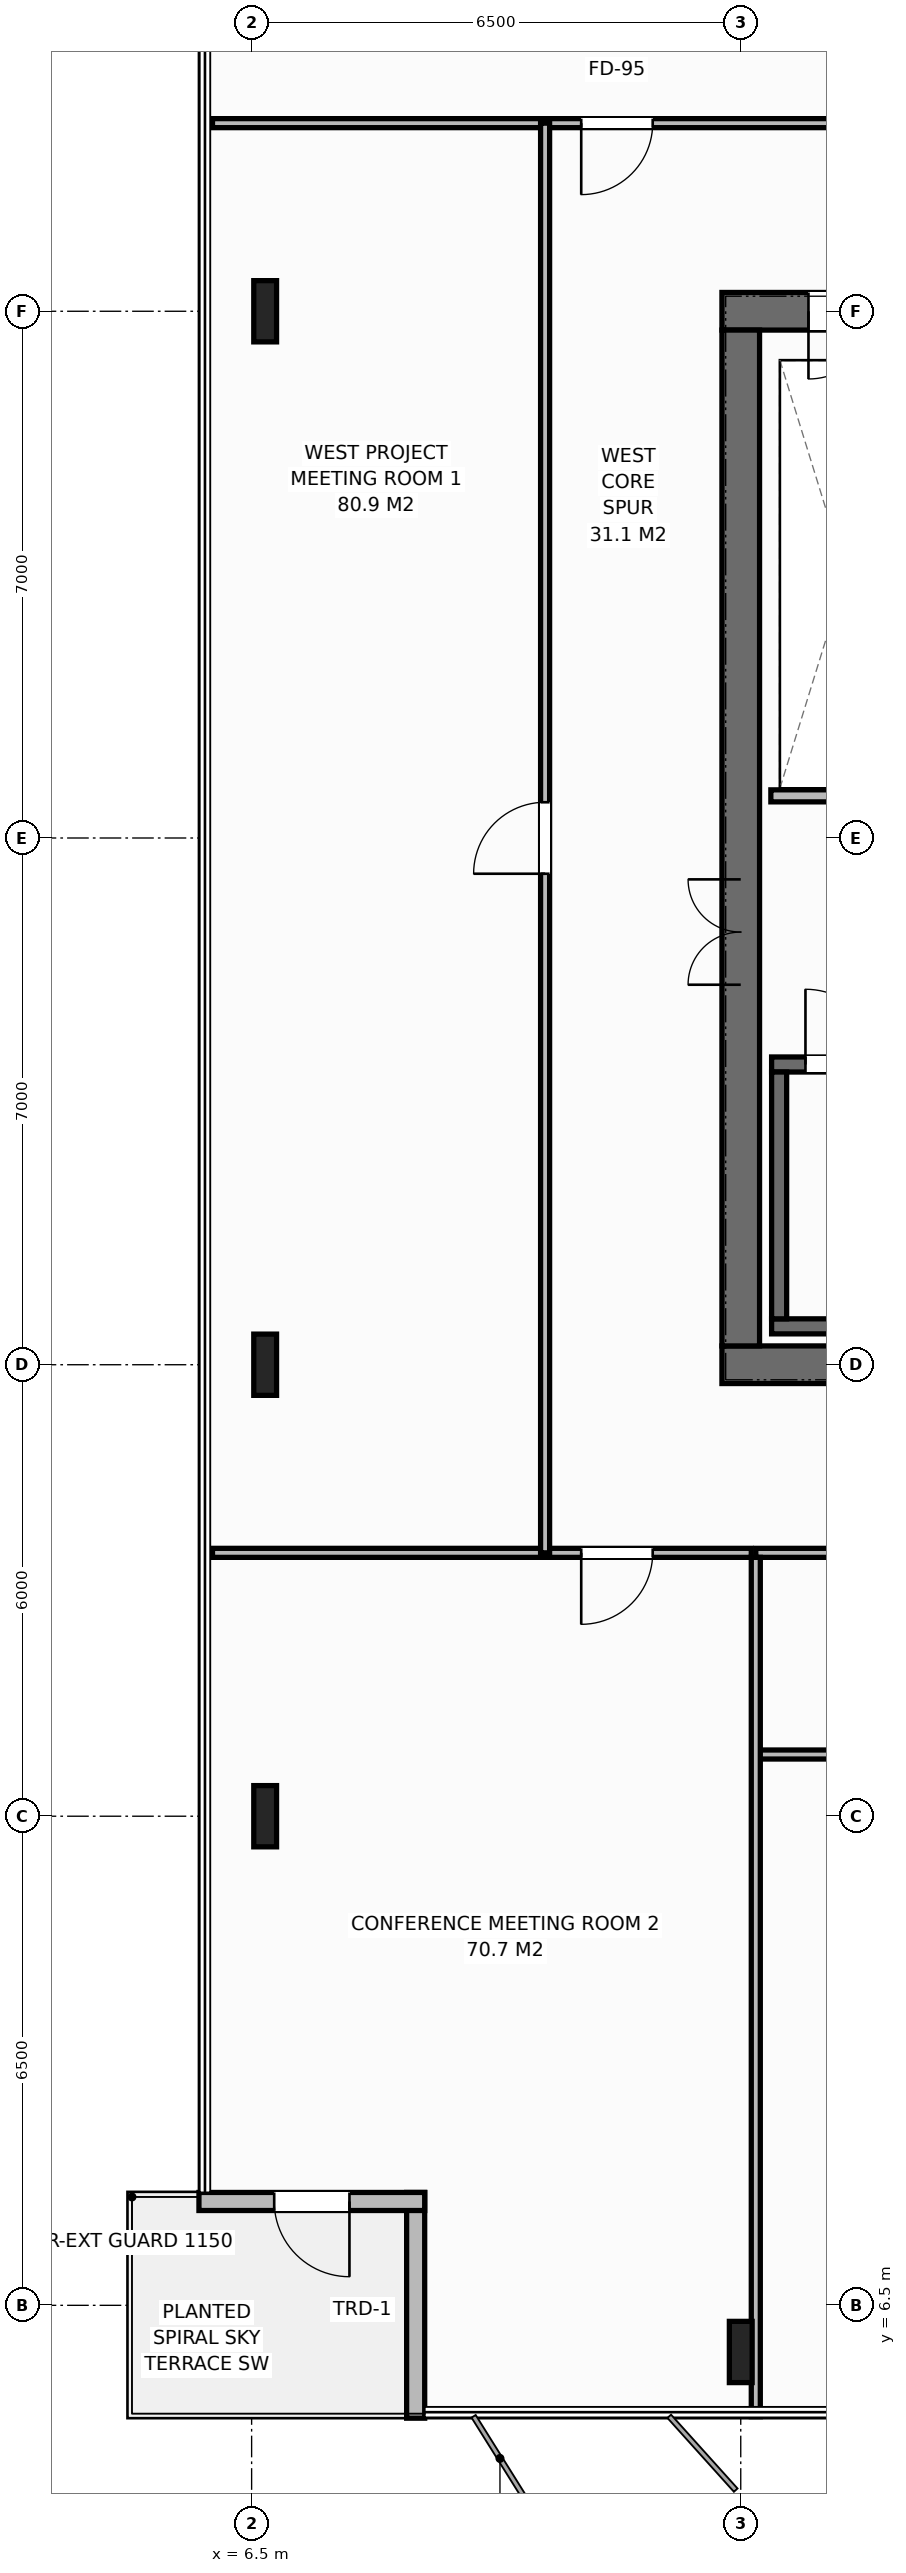
"""IFC4 building model, lengths in metres.
Left out: names, types, materials, properties, quantities, classifications, styles, units other than length and angle.
Written with IfcOpenShell. Run it as: python <this file> out.ifc"""

import sys

from ifc_helpers import new_model, si_unit, direction, frame, frame_2d, origin, origin_2d, place, context, subcontext, project, spatial, rectangle, i_section, extrude, element, fill, save


model = new_model("IFC4")
c1 = context("Model", 3, precision=1e-05, world=origin(), true_north=direction((0.0, 1.0)))
c2 = subcontext(c1, "Body", "Model", "MODEL_VIEW")
j1 = project(units=[si_unit("LENGTHUNIT", "METRE"), si_unit("PLANEANGLEUNIT", "RADIAN")], contexts=[c1])
p1 = place(None, origin())
s1 = spatial("IfcSite", under=j1, at=p1, CompositionType="ELEMENT")
p2 = place(p1, origin())
s2 = spatial("IfcBuilding", under=s1, at=p2, CompositionType="ELEMENT")
p3 = place(p2, frame((0.0, 0.0, 236.6)))
s3 = spatial("IfcBuildingStorey", under=s2, at=p3, CompositionType="ELEMENT", Elevation=236.6)
p4 = place(p3, frame((12.75, 19.0, 0.0), z_axis=(0.0, 0.0, 1.0), x_axis=(1.0, 0.0, 0.0)))
e1 = element("IfcWall", 1, at=p4, inside=s3, PredefinedType="SHEAR", context=c2, shape_type="SweptSolid", body=[
    extrude(rectangle(XDim=13.5, YDim=0.5, at=frame_2d((6.75, 0.0))), origin(), (0.0, 0.0, 1.0), 3.8),
])
p5 = place(p4, frame((9.13, 0.0, 0.0)))
e2 = element("IfcOpeningElement", 2, at=p5, cuts=e1, PredefinedType="OPENING", context=c2, shape_type="SweptSolid", body=[
    extrude(rectangle(XDim=1.4, YDim=2.2, at=frame_2d((0.7, 1.1))), frame((0.0, 0.26, 0.0), z_axis=(0.0, -1.0, 0.0), x_axis=(1.0, 0.0, 0.0)), (0.0, 0.0, 1.0), 0.52),
])
p6 = place(p3, frame((12.75, 33.0, 0.0), z_axis=(0.0, 0.0, 1.0), x_axis=(1.0, 0.0, 0.0)))
e3 = element("IfcWall", 3, at=p6, inside=s3, PredefinedType="SHEAR", context=c2, shape_type="SweptSolid", body=[
    extrude(rectangle(XDim=13.5, YDim=0.5, at=frame_2d((6.75, 0.0))), origin(), (0.0, 0.0, 1.0), 3.8),
])
p7 = place(p6, frame((1.15, 0.0, 0.0)))
e4 = element("IfcOpeningElement", 4, at=p7, cuts=e3, PredefinedType="OPENING", context=c2, shape_type="SweptSolid", body=[
    extrude(rectangle(XDim=0.9, YDim=2.15, at=frame_2d((0.45, 1.075))), frame((0.0, 0.26, 0.0), z_axis=(0.0, -1.0, 0.0), x_axis=(1.0, 0.0, 0.0)), (0.0, 0.0, 1.0), 0.52),
])
p8 = place(p6, frame((3.2, 0.0, 0.0)))
e5 = element("IfcOpeningElement", 5, at=p8, cuts=e3, PredefinedType="OPENING", context=c2, shape_type="SweptSolid", body=[
    extrude(rectangle(XDim=0.95, YDim=2.15, at=frame_2d((0.475, 1.075))), frame((0.0, 0.26, 0.0), z_axis=(0.0, -1.0, 0.0), x_axis=(1.0, 0.0, 0.0)), (0.0, 0.0, 1.0), 0.52),
])
p9 = place(p6, frame((6.05, 0.0, 0.0)))
e6 = element("IfcOpeningElement", 6, at=p9, cuts=e3, PredefinedType="OPENING", context=c2, shape_type="SweptSolid", body=[
    extrude(rectangle(XDim=0.95, YDim=2.15, at=frame_2d((0.475, 1.075))), frame((0.0, 0.26, 0.0), z_axis=(0.0, -1.0, 0.0), x_axis=(1.0, 0.0, 0.0)), (0.0, 0.0, 1.0), 0.52),
])
p10 = place(p6, frame((9.13, 0.0, 0.0)))
e7 = element("IfcOpeningElement", 7, at=p10, cuts=e3, PredefinedType="OPENING", context=c2, shape_type="SweptSolid", body=[
    extrude(rectangle(XDim=1.4, YDim=2.2, at=frame_2d((0.7, 1.1))), frame((0.0, 0.26, 0.0), z_axis=(0.0, -1.0, 0.0), x_axis=(1.0, 0.0, 0.0)), (0.0, 0.0, 1.0), 0.52),
])
p11 = place(p3, frame((13.0, 19.25, 0.0), z_axis=(0.0, 0.0, 1.0), x_axis=(0.0, 1.0, 0.0)))
e8 = element("IfcWall", 8, at=p11, inside=s3, PredefinedType="SHEAR", context=c2, shape_type="SweptSolid", body=[
    extrude(rectangle(XDim=13.5, YDim=0.5, at=frame_2d((6.75, 0.0))), origin(), (0.0, 0.0, 1.0), 3.8),
])
p12 = place(p11, frame((4.8, 0.0, 0.0)))
e9 = element("IfcOpeningElement", 9, at=p12, cuts=e8, PredefinedType="OPENING", context=c2, shape_type="SweptSolid", body=[
    extrude(rectangle(XDim=1.4, YDim=2.2, at=frame_2d((0.7, 1.1))), frame((0.0, 0.26, 0.0), z_axis=(0.0, -1.0, 0.0), x_axis=(1.0, 0.0, 0.0)), (0.0, 0.0, 1.0), 0.52),
])
p13 = place(p3, frame((13.41, 19.51, 0.0), z_axis=(0.0, 0.0, 1.0), x_axis=(1.0, 0.0, 0.0)))
e10 = element("IfcWall", 10, at=p13, inside=s3, PredefinedType="SHEAR", context=c2, shape_type="SweptSolid", body=[
    extrude(rectangle(XDim=8.43, YDim=0.2, at=frame_2d((4.215, 0.0))), origin(), (0.0, 0.0, 1.0), 3.8),
])
p14 = place(p3, frame((13.41, 22.99, 0.0), z_axis=(0.0, 0.0, 1.0), x_axis=(1.0, 0.0, 0.0)))
e11 = element("IfcWall", 11, at=p14, inside=s3, PredefinedType="SHEAR", context=c2, shape_type="SweptSolid", body=[
    extrude(rectangle(XDim=8.43, YDim=0.2, at=frame_2d((4.215, 0.0))), origin(), (0.0, 0.0, 1.0), 3.8),
])
p15 = place(p14, frame((0.45, 0.0, 0.0)))
e12 = element("IfcOpeningElement", 12, at=p15, cuts=e11, PredefinedType="OPENING", context=c2, shape_type="SweptSolid", body=[
    extrude(rectangle(XDim=1.0, YDim=2.15, at=frame_2d((0.5, 1.075))), frame((0.0, 0.11, 0.0), z_axis=(0.0, -1.0, 0.0), x_axis=(1.0, 0.0, 0.0)), (0.0, 0.0, 1.0), 0.22),
])
p16 = place(p3, frame((13.51, 19.61, 0.0), z_axis=(0.0, 0.0, 1.0), x_axis=(0.0, 1.0, 0.0)))
e13 = element("IfcWall", 13, at=p16, inside=s3, PredefinedType="SHEAR", context=c2, shape_type="SweptSolid", body=[
    extrude(rectangle(XDim=3.28, YDim=0.2, at=frame_2d((1.64, 0.0))), origin(), (0.0, 0.0, 1.0), 3.8),
])
for number, where, z_axis, x_axis in (
    (14, (13.0, 5.88, 0.0), (0.0, 0.0, 1.0), (1.0, 0.0, 0.0)),
    (15, (6.68, 13.0, 0.0), (0.0, 0.0, 1.0), (1.0, 0.0, 0.0)),
    (16, (6.68, 19.0, 0.0), (0.0, 0.0, 1.0), (1.0, 0.0, 0.0)),
    (17, (6.68, 33.0, 0.0), (0.0, 0.0, 1.0), (1.0, 0.0, 0.0)),
):
    element("IfcColumn", number, at=place(p3, frame(where, z_axis=z_axis, x_axis=x_axis)), inside=s3, PredefinedType="COLUMN", context=c2, shape_type="SweptSolid", body=[
        extrude(i_section(OverallWidth=0.303, OverallDepth=0.814, WebThickness=0.021, FlangeThickness=0.04, at=origin_2d()), origin(), (0.0, 0.0, 1.0), 3.8),
    ])
p17 = place(p3, frame((8.68, 5.0, 0.0), z_axis=(0.0, 0.0, 1.0), x_axis=(0.0, 1.0, 0.0)))
e18 = element("IfcWall", 18, at=p17, inside=s3, PredefinedType="STANDARD", context=c2, shape_type="SweptSolid", body=[
    extrude(rectangle(XDim=3.0, YDim=0.24, at=frame_2d((1.5, 0.0))), origin(), (0.0, 0.0, 1.0), 3.58),
])
p18 = place(p3, frame((8.8, 7.88, 0.0), z_axis=(0.0, 0.0, 1.0), x_axis=(-1.0, 0.0, 0.0)))
e19 = element("IfcWall", 19, at=p18, inside=s3, PredefinedType="STANDARD", context=c2, shape_type="SweptSolid", body=[
    extrude(rectangle(XDim=3.0, YDim=0.24, at=frame_2d((1.5, 0.0))), origin(), (0.0, 0.0, 1.0), 3.58),
])
p19 = place(p18, frame((1.0, 0.0, 0.0)))
e20 = element("IfcOpeningElement", 20, at=p19, cuts=e19, PredefinedType="OPENING", context=c2, shape_type="SweptSolid", body=[
    extrude(rectangle(XDim=1.0, YDim=2.2, at=frame_2d((0.5, 1.1))), frame((0.0, 0.13, 0.0), z_axis=(0.0, -1.0, 0.0), x_axis=(1.0, 0.0, 0.0)), (0.0, 0.0, 1.0), 0.26),
])
p20 = place(p3, frame((13.4, 26.56, 0.0), z_axis=(0.0, 0.0, 1.0), x_axis=(1.0, 0.0, 0.0)))
e21 = element("IfcWall", 21, at=p20, inside=s3, PredefinedType="STANDARD", context=c2, shape_type="SweptSolid", body=[
    extrude(rectangle(XDim=8.34, YDim=0.16, at=frame_2d((4.17, 0.0))), origin(), (0.0, 0.0, 1.0), 3.58),
])
p21 = place(p3, frame((13.2, 16.5, 0.0), z_axis=(0.0, 0.0, 1.0), x_axis=(1.0, 0.0, 0.0)))
e22 = element("IfcWall", 22, at=p21, inside=s3, PredefinedType="PARTITIONING", context=c2, shape_type="SweptSolid", body=[
    extrude(rectangle(XDim=13.16, YDim=0.12, at=frame_2d((6.58, 0.0))), origin(), (0.0, 0.0, 1.0), 3.58),
])
p22 = place(p21, frame((1.35, 0.0, 0.0)))
e23 = element("IfcOpeningElement", 23, at=p22, cuts=e22, PredefinedType="OPENING", context=c2, shape_type="SweptSolid", body=[
    extrude(rectangle(XDim=0.9, YDim=2.15, at=frame_2d((0.45, 1.075))), frame((0.0, 0.07, 0.0), z_axis=(0.0, -1.0, 0.0), x_axis=(1.0, 0.0, 0.0)), (0.0, 0.0, 1.0), 0.14),
])
p23 = place(p21, frame((4.05, 0.0, 0.0)))
e24 = element("IfcOpeningElement", 24, at=p23, cuts=e22, PredefinedType="OPENING", context=c2, shape_type="SweptSolid", body=[
    extrude(rectangle(XDim=0.9, YDim=2.15, at=frame_2d((0.45, 1.075))), frame((0.0, 0.07, 0.0), z_axis=(0.0, -1.0, 0.0), x_axis=(1.0, 0.0, 0.0)), (0.0, 0.0, 1.0), 0.14),
])
p24 = place(p21, frame((8.25, 0.0, 0.0)))
e25 = element("IfcOpeningElement", 25, at=p24, cuts=e22, PredefinedType="OPENING", context=c2, shape_type="SweptSolid", body=[
    extrude(rectangle(XDim=0.9, YDim=2.15, at=frame_2d((0.45, 1.075))), frame((0.0, 0.07, 0.0), z_axis=(0.0, -1.0, 0.0), x_axis=(1.0, 0.0, 0.0)), (0.0, 0.0, 1.0), 0.14),
])
p25 = place(p21, frame((11.0, 0.0, 0.0)))
e26 = element("IfcOpeningElement", 26, at=p25, cuts=e22, PredefinedType="OPENING", context=c2, shape_type="SweptSolid", body=[
    extrude(rectangle(XDim=0.95, YDim=2.15, at=frame_2d((0.475, 1.075))), frame((0.0, 0.07, 0.0), z_axis=(0.0, -1.0, 0.0), x_axis=(1.0, 0.0, 0.0)), (0.0, 0.0, 1.0), 0.14),
])
p26 = place(p3, frame((13.2, 13.82, 0.0), z_axis=(0.0, 0.0, 1.0), x_axis=(1.0, 0.0, 0.0)))
e27 = element("IfcWall", 27, at=p26, inside=s3, PredefinedType="PARTITIONING", context=c2, shape_type="SweptSolid", body=[
    extrude(rectangle(XDim=13.16, YDim=0.12, at=frame_2d((6.58, 0.0))), origin(), (0.0, 0.0, 1.0), 3.58),
])
p27 = place(p3, frame((5.98, 35.5, 0.0), z_axis=(0.0, 0.0, 1.0), x_axis=(1.0, 0.0, 0.0)))
e28 = element("IfcWall", 28, at=p27, inside=s3, PredefinedType="PARTITIONING", context=c2, shape_type="SweptSolid", body=[
    extrude(rectangle(XDim=11.642, YDim=0.12, at=frame_2d((5.821, 0.0))), origin(), (0.0, 0.0, 1.0), 3.58),
])
p28 = place(p27, frame((4.9, 0.0, 0.0)))
e29 = element("IfcOpeningElement", 29, at=p28, cuts=e28, PredefinedType="OPENING", context=c2, shape_type="SweptSolid", body=[
    extrude(rectangle(XDim=0.95, YDim=2.15, at=frame_2d((0.475, 1.075))), frame((0.0, 0.07, 0.0), z_axis=(0.0, -1.0, 0.0), x_axis=(1.0, 0.0, 0.0)), (0.0, 0.0, 1.0), 0.14),
])
p29 = place(p3, frame((13.2, 5.02, 0.0), z_axis=(0.0, 0.0, 1.0), x_axis=(0.0, 1.0, 0.0)))
e30 = element("IfcWall", 30, at=p29, inside=s3, PredefinedType="PARTITIONING", context=c2, shape_type="SweptSolid", body=[
    extrude(rectangle(XDim=11.42, YDim=0.12, at=frame_2d((5.71, 0.0))), origin(), (0.0, 0.0, 1.0), 2.88),
])
p30 = place(p3, frame((5.98, 16.5, 0.0), z_axis=(0.0, 0.0, 1.0), x_axis=(1.0, 0.0, 0.0)))
e31 = element("IfcWall", 31, at=p30, inside=s3, PredefinedType="PARTITIONING", context=c2, shape_type="SweptSolid", body=[
    extrude(rectangle(XDim=7.16, YDim=0.12, at=frame_2d((3.58, 0.0))), origin(), (0.0, 0.0, 1.0), 3.58),
])
p31 = place(p30, frame((4.9, 0.0, 0.0)))
e32 = element("IfcOpeningElement", 32, at=p31, cuts=e31, PredefinedType="OPENING", context=c2, shape_type="SweptSolid", body=[
    extrude(rectangle(XDim=0.95, YDim=2.15, at=frame_2d((0.475, 1.075))), frame((0.0, 0.07, 0.0), z_axis=(0.0, -1.0, 0.0), x_axis=(1.0, 0.0, 0.0)), (0.0, 0.0, 1.0), 0.14),
])
p32 = place(p3, frame((10.4, 16.5, 0.0), z_axis=(0.0, 0.0, 1.0), x_axis=(0.0, 1.0, 0.0)))
e33 = element("IfcWall", 33, at=p32, inside=s3, PredefinedType="PARTITIONING", context=c2, shape_type="SweptSolid", body=[
    extrude(rectangle(XDim=19.0, YDim=0.12, at=frame_2d((9.5, 0.0))), origin(), (0.0, 0.0, 1.0), 3.58),
])
p33 = place(p32, frame((9.025, 0.0, 0.0)))
e34 = element("IfcOpeningElement", 34, at=p33, cuts=e33, PredefinedType="OPENING", context=c2, shape_type="SweptSolid", body=[
    extrude(rectangle(XDim=0.95, YDim=2.15, at=frame_2d((0.475, 1.075))), frame((0.0, 0.07, 0.0), z_axis=(0.0, -1.0, 0.0), x_axis=(1.0, 0.0, 0.0)), (0.0, 0.0, 1.0), 0.14),
])
p34 = place(p19, origin())
e35 = element("IfcDoor", 35, at=p34, inside=s3, OperationType="SINGLE_SWING_LEFT", PredefinedType="DOOR", context=c2, shape_type="SweptSolid", body=[
    extrude(rectangle(XDim=1.0, YDim=2.2, at=frame_2d((0.5, 1.1))), frame((0.0, 0.025, 0.0), z_axis=(0.0, -1.0, 0.0), x_axis=(1.0, 0.0, 0.0)), (0.0, 0.0, 1.0), 0.05),
])
fill(e20, e35)
p35 = place(p15, origin())
e36 = element("IfcDoor", 36, at=p35, inside=s3, OperationType="SINGLE_SWING_LEFT", PredefinedType="DOOR", context=c2, shape_type="SweptSolid", body=[
    extrude(rectangle(XDim=1.0, YDim=2.15, at=frame_2d((0.5, 1.075))), frame((0.0, 0.025, 0.0), z_axis=(0.0, -1.0, 0.0), x_axis=(1.0, 0.0, 0.0)), (0.0, 0.0, 1.0), 0.05),
])
fill(e12, e36)
p36 = place(p12, origin())
e37 = element("IfcDoor", 37, at=p36, inside=s3, OperationType="DOUBLE_DOOR_SINGLE_SWING", PredefinedType="DOOR", context=c2, shape_type="SweptSolid", body=[
    extrude(rectangle(XDim=1.4, YDim=2.2, at=frame_2d((0.7, 1.1))), frame((0.0, 0.025, 0.0), z_axis=(0.0, -1.0, 0.0), x_axis=(1.0, 0.0, 0.0)), (0.0, 0.0, 1.0), 0.05),
])
fill(e9, e37)
p37 = place(p7, origin())
e38 = element("IfcDoor", 38, at=p37, inside=s3, OperationType="SINGLE_SWING_RIGHT", PredefinedType="DOOR", context=c2, shape_type="SweptSolid", body=[
    extrude(rectangle(XDim=0.9, YDim=2.15, at=frame_2d((0.45, 1.075))), frame((0.0, -0.025, 0.0), z_axis=(0.0, -1.0, 0.0), x_axis=(1.0, 0.0, 0.0)), (0.0, 0.0, 1.0), 0.05),
])
fill(e4, e38)
p38 = place(p28, origin())
e39 = element("IfcDoor", 39, at=p38, inside=s3, OperationType="SINGLE_SWING_RIGHT", PredefinedType="DOOR", context=c2, shape_type="SweptSolid", body=[
    extrude(rectangle(XDim=0.95, YDim=2.15, at=frame_2d((0.475, 1.075))), frame((0.0, 0.025, 0.0), z_axis=(0.0, -1.0, 0.0), x_axis=(1.0, 0.0, 0.0)), (0.0, 0.0, 1.0), 0.05),
])
fill(e29, e39)
p39 = place(p31, origin())
e40 = element("IfcDoor", 40, at=p39, inside=s3, OperationType="SINGLE_SWING_RIGHT", PredefinedType="DOOR", context=c2, shape_type="SweptSolid", body=[
    extrude(rectangle(XDim=0.95, YDim=2.15, at=frame_2d((0.475, 1.075))), frame((0.0, 0.025, 0.0), z_axis=(0.0, -1.0, 0.0), x_axis=(1.0, 0.0, 0.0)), (0.0, 0.0, 1.0), 0.05),
])
fill(e32, e40)
p40 = place(p33, origin())
e41 = element("IfcDoor", 41, at=p40, inside=s3, OperationType="SINGLE_SWING_LEFT", PredefinedType="DOOR", context=c2, shape_type="SweptSolid", body=[
    extrude(rectangle(XDim=0.95, YDim=2.15, at=frame_2d((0.475, 1.075))), frame((0.0, 0.025, 0.0), z_axis=(0.0, -1.0, 0.0), x_axis=(1.0, 0.0, 0.0)), (0.0, 0.0, 1.0), 0.05),
])
fill(e34, e41)
save(model, sys.argv[1])
